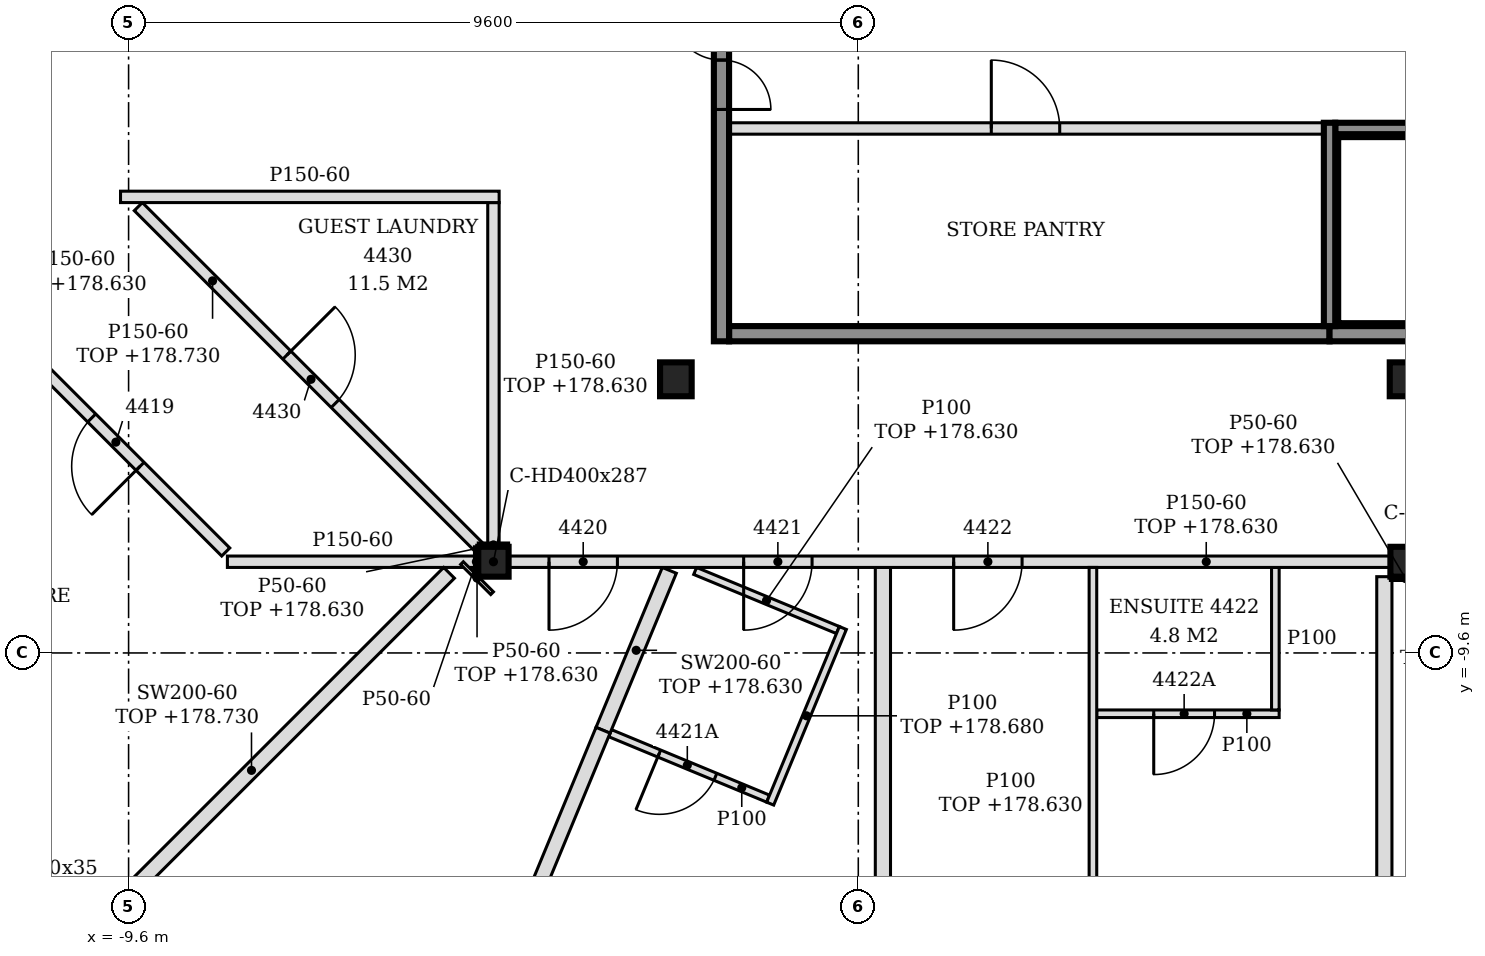
"""IFC4 building model, lengths in metres.
Left out: names, types, materials, properties, quantities, classifications, styles, units other than length and angle.
Written with IfcOpenShell. Run it as: python <this file> out.ifc"""

import sys

from ifc_helpers import new_model, si_unit, direction, frame, frame_2d, origin, origin_2d, place, context, subcontext, project, spatial, polyline, rectangle, i_section, outline, extrude, element, fill, save


model = new_model("IFC4")
c1 = context("Model", 3, precision=1e-05, world=origin(), true_north=direction((0.0, 1.0)))
c2 = subcontext(c1, "Body", "Model", "MODEL_VIEW")
j1 = project(units=[si_unit("LENGTHUNIT", "METRE"), si_unit("PLANEANGLEUNIT", "RADIAN")], contexts=[c1])
p1 = place(None, origin())
s1 = spatial("IfcSite", under=j1, at=p1, CompositionType="ELEMENT")
p2 = place(p1, origin())
s2 = spatial("IfcBuilding", under=s1, at=p2, CompositionType="ELEMENT")
p3 = place(p2, frame((0.0, 0.0, 175.8)))
s3 = spatial("IfcBuildingStorey", under=s2, at=p3, CompositionType="ELEMENT", Elevation=175.8)
for number, where, z_axis, x_axis in (
    (1, (-4.8, -8.4, -0.15), (0.0, 0.0, 1.0), (1.0, 0.0, 0.0)),
    (2, (7.2, -8.4, -0.15), (0.0, 0.0, 1.0), (1.0, 0.0, 0.0)),
):
    element("IfcColumn", number, at=place(p3, frame(where, z_axis=z_axis, x_axis=x_axis)), inside=s3, PredefinedType="COLUMN", context=c2, shape_type="SweptSolid", body=[
        extrude(i_section(OverallWidth=0.399, OverallDepth=0.393, WebThickness=0.023, FlangeThickness=0.037, FilletRadius=0.015, at=origin_2d()), origin(), (0.0, 0.0, 1.0), 3.6),
    ])
for number, where, z_axis, x_axis in (
    (3, (-2.4, -6.0, -0.15), (0.0, 0.0, 1.0), (1.0, 0.0, 0.0)),
    (4, (7.2, -6.0, -0.15), (0.0, 0.0, 1.0), (1.0, 0.0, 0.0)),
):
    element("IfcColumn", number, at=place(p3, frame(where, z_axis=z_axis, x_axis=x_axis)), inside=s3, PredefinedType="COLUMN", context=c2, shape_type="SweptSolid", body=[
        extrude(i_section(OverallWidth=0.416, OverallDepth=0.446, WebThickness=0.039, FlangeThickness=0.063, FilletRadius=0.015, at=origin_2d()), origin(), (0.0, 0.0, 1.0), 3.6),
    ])
p4 = place(p3, frame((-1.7, -5.4, 0.0), z_axis=(0.0, 0.0, 1.0), x_axis=(1.0, 0.0, 0.0)))
e5 = element("IfcWall", 5, at=p4, inside=s3, PredefinedType="SOLIDWALL", context=c2, shape_type="SweptSolid", body=[
    extrude(rectangle(XDim=7.9, YDim=0.2, at=frame_2d((3.95, 0.0))), origin(), (0.0, 0.0, 1.0), 3.45),
])
p5 = place(p3, frame((6.2, -5.4, 0.0), z_axis=(0.0, 0.0, 1.0), x_axis=(1.0, 0.0, 0.0)))
e6 = element("IfcWall", 6, at=p5, inside=s3, PredefinedType="SOLIDWALL", context=c2, shape_type="SweptSolid", body=[
    extrude(rectangle(XDim=6.5, YDim=0.2, at=frame_2d((3.25, 0.0))), origin(), (0.0, 0.0, 1.0), 3.45),
])
p6 = place(p3, frame((-1.7, -2.7, 0.0), z_axis=(0.0, 0.0, 1.0), x_axis=(1.0, 0.0, 0.0)))
e7 = element("IfcWall", 7, at=p6, inside=s3, PredefinedType="PARTITIONING", context=c2, shape_type="SweptSolid", body=[
    extrude(rectangle(XDim=7.825, YDim=0.15, at=frame_2d((3.913, 0.0))), origin(), (0.0, 0.0, 1.0), 3.45),
])
p7 = place(p6, frame((3.45, 0.0, 0.0)))
e8 = element("IfcOpeningElement", 8, at=p7, cuts=e7, PredefinedType="OPENING", context=c2, shape_type="SweptSolid", body=[
    extrude(rectangle(XDim=0.9, YDim=2.1, at=frame_2d((0.45, 1.05))), frame((0.0, 0.085, 0.0), z_axis=(0.0, -1.0, 0.0), x_axis=(1.0, 0.0, 0.0)), (0.0, 0.0, 1.0), 0.17),
])
p8 = place(p3, frame((6.275, -2.7, 0.0), z_axis=(0.0, 0.0, 1.0), x_axis=(1.0, 0.0, 0.0)))
e9 = element("IfcWall", 9, at=p8, inside=s3, PredefinedType="SOLIDWALL", context=c2, shape_type="SweptSolid", body=[
    extrude(rectangle(XDim=6.35, YDim=0.15, at=frame_2d((3.175, 0.0))), origin(), (0.0, 0.0, 1.0), 3.45),
])
p9 = place(p8, frame((5.225, 0.0, 0.0)))
e10 = element("IfcOpeningElement", 10, at=p9, cuts=e9, PredefinedType="OPENING", context=c2, shape_type="SweptSolid", body=[
    extrude(rectangle(XDim=1.0, YDim=2.1, at=frame_2d((0.5, 1.05))), frame((0.0, 0.085, 0.0), z_axis=(0.0, -1.0, 0.0), x_axis=(1.0, 0.0, 0.0)), (0.0, 0.0, 1.0), 0.17),
])
p10 = place(p3, frame((-1.8, -5.5, 0.0), z_axis=(0.0, 0.0, 1.0), x_axis=(0.0, 1.0, 0.0)))
e11 = element("IfcWall", 11, at=p10, inside=s3, PredefinedType="SOLIDWALL", context=c2, shape_type="SweptSolid", body=[
    extrude(rectangle(XDim=15.8, YDim=0.2, at=frame_2d((7.9, 0.0))), origin(), (0.0, 0.0, 1.0), 3.45),
])
p11 = place(p10, frame((3.05, 0.0, 0.0)))
e12 = element("IfcOpeningElement", 12, at=p11, cuts=e11, PredefinedType="OPENING", context=c2, shape_type="SweptSolid", body=[
    extrude(rectangle(XDim=1.3, YDim=2.1, at=frame_2d((0.65, 1.05))), frame((0.0, 0.11, 0.0), z_axis=(0.0, -1.0, 0.0), x_axis=(1.0, 0.0, 0.0)), (0.0, 0.0, 1.0), 0.22),
])
p12 = place(p10, frame((11.45, 0.0, 0.0)))
e13 = element("IfcOpeningElement", 13, at=p12, cuts=e11, PredefinedType="OPENING", context=c2, shape_type="SweptSolid", body=[
    extrude(rectangle(XDim=1.3, YDim=2.1, at=frame_2d((0.65, 1.05))), frame((0.0, 0.11, 0.0), z_axis=(0.0, -1.0, 0.0), x_axis=(1.0, 0.0, 0.0)), (0.0, 0.0, 1.0), 0.22),
])
p13 = place(p3, frame((6.2, -5.3, 0.0), z_axis=(0.0, 0.0, 1.0), x_axis=(0.0, 1.0, 0.0)))
e14 = element("IfcWall", 14, at=p13, inside=s3, PredefinedType="SOLIDWALL", context=c2, shape_type="SweptSolid", body=[
    extrude(rectangle(XDim=2.675, YDim=0.15, at=frame_2d((1.337, 0.0))), origin(), (0.0, 0.0, 1.0), 3.45),
])
p14 = place(p3, frame((0.324, -19.053, 0.0), z_axis=(0.0, 0.0, 1.0), x_axis=(0.0, 1.0, 0.0)))
e15 = element("IfcWall", 15, at=p14, inside=s3, PredefinedType="PARTITIONING", context=c2, shape_type="SweptSolid", body=[
    extrude(outline(polyline([(0.0, 0.0), (10.578, 0.0), (10.578, 2.83), (10.503, 2.83), (10.501, 3.45), (8.958, 3.45), (8.956, 2.88), (8.748, 2.88), (8.746, 3.45), (4.158, 3.45), (4.156, 2.88), (3.948, 2.88), (3.946, 3.45), (0.303, 3.45), (0.301, 2.93), (0.003, 2.93), (0.001, 3.45), (0.0, 3.45), (0.0, 0.0)])), frame((0.0, 0.1, 0.0), z_axis=(0.0, -1.0, 0.0), x_axis=(1.0, 0.0, 0.0)), (0.0, 0.0, 1.0), 0.2),
])
p15 = place(p3, frame((6.921, -19.053, 0.0), z_axis=(0.0, 0.0, 1.0), x_axis=(0.0, 1.0, 0.0)))
e16 = element("IfcWall", 16, at=p15, inside=s3, PredefinedType="PARTITIONING", context=c2, shape_type="SweptSolid", body=[
    extrude(outline(polyline([(0.0, 0.0), (10.457, 0.0), (10.457, 3.45), (8.958, 3.45), (8.956, 2.88), (8.748, 2.88), (8.746, 3.45), (4.158, 3.45), (4.156, 2.88), (3.948, 2.88), (3.946, 3.45), (0.303, 3.45), (0.301, 2.93), (0.003, 2.93), (0.001, 3.45), (0.0, 3.45), (0.0, 0.0)])), frame((0.0, 0.1, 0.0), z_axis=(0.0, -1.0, 0.0), x_axis=(1.0, 0.0, 0.0)), (0.0, 0.0, 1.0), 0.2),
])
p16 = place(p3, frame((3.087, -18.777, 0.0), z_axis=(0.0, 0.0, 1.0), x_axis=(0.0, 1.0, 0.0)))
e17 = element("IfcWall", 17, at=p16, inside=s3, PredefinedType="PARTITIONING", context=c2, shape_type="SweptSolid", body=[
    extrude(outline(polyline([(0.495, 0.0), (10.302, 0.0), (10.302, 0.863), (10.302, 1.725), (10.302, 2.587), (10.302, 2.83), (0.252, 2.83), (0.35, 2.587), (0.495, 1.725), (0.495, 0.863), (0.495, 0.0)])), frame((0.0, 0.05, 0.0), z_axis=(0.0, -1.0, 0.0), x_axis=(1.0, 0.0, 0.0)), (0.0, 0.0, 1.0), 0.1),
])
p17 = place(p16, frame((3.452, 0.0, 0.0)))
e18 = element("IfcOpeningElement", 18, at=p17, cuts=e17, PredefinedType="OPENING", context=c2, shape_type="SweptSolid", body=[
    extrude(rectangle(XDim=0.9, YDim=2.1, at=frame_2d((0.45, 1.05))), frame((0.0, 0.06, 0.0), z_axis=(0.0, -1.0, 0.0), x_axis=(1.0, 0.0, 0.0)), (0.0, 0.0, 1.0), 0.12),
])
p18 = place(p3, frame((-6.467, -18.123, 0.0), z_axis=(0.0, 0.0, 1.0), x_axis=(0.382668510089, 0.923885713379, 0.0)))
e19 = element("IfcWall", 19, at=p18, inside=s3, PredefinedType="PARTITIONING", context=c2, shape_type="SweptSolid", body=[
    extrude(rectangle(XDim=8.124, YDim=0.2, at=frame_2d((4.062, 0.0))), origin(), (0.0, 0.0, 1.0), 2.83),
])
p19 = place(p3, frame((-10.583, -13.743, 0.0), z_axis=(0.0, 0.0, 1.0), x_axis=(0.707173198016, 0.707040358118, 0.0)))
e20 = element("IfcWall", 20, at=p19, inside=s3, PredefinedType="PARTITIONING", context=c2, shape_type="SweptSolid", body=[
    extrude(rectangle(XDim=7.351, YDim=0.2, at=frame_2d((3.676, 0.0))), origin(), (0.0, 0.0, 1.0), 2.93),
])
p20 = place(p3, frame((-1.159, -11.582, 0.0), z_axis=(0.0, 0.0, 1.0), x_axis=(0.382423652519, 0.923987094062, 0.0)))
e21 = element("IfcWall", 21, at=p20, inside=s3, PredefinedType="PARTITIONING", context=c2, shape_type="SweptSolid", body=[
    extrude(rectangle(XDim=2.501, YDim=0.1, at=frame_2d((1.25, 0.0))), origin(), (0.0, 0.0, 1.0), 2.88),
])
p21 = place(p3, frame((-1.186, -11.517, 0.0), z_axis=(0.0, 0.0, 1.0), x_axis=(-0.923835689206, 0.382789262323, 0.0)))
e22 = element("IfcWall", 22, at=p21, inside=s3, PredefinedType="PARTITIONING", context=c2, shape_type="SweptSolid", body=[
    extrude(rectangle(XDim=2.251, YDim=0.1, at=frame_2d((1.125, 0.0))), origin(), (0.0, 0.0, 1.0), 3.45),
])
p22 = place(p21, frame((0.751, 0.0, 0.0)))
e23 = element("IfcOpeningElement", 23, at=p22, cuts=e22, PredefinedType="OPENING", context=c2, shape_type="SweptSolid", body=[
    extrude(rectangle(XDim=0.8, YDim=2.1, at=frame_2d((0.4, 1.05))), frame((0.0, 0.06, 0.0), z_axis=(0.0, -1.0, 0.0), x_axis=(1.0, 0.0, 0.0)), (0.0, 0.0, 1.0), 0.12),
])
p23 = place(p3, frame((-3.358, -10.617, 0.0), z_axis=(0.0, 0.0, 1.0), x_axis=(0.382840979218, 0.923814258729, 0.0)))
e24 = element("IfcWall", 24, at=p23, inside=s3, PredefinedType="PARTITIONING", context=c2, shape_type="SweptSolid", body=[
    extrude(rectangle(XDim=2.277, YDim=0.2, at=frame_2d((1.139, 0.0))), origin(), (0.0, 0.0, 1.0), 2.83),
])
p24 = place(p3, frame((3.137, -10.4, 0.0), z_axis=(0.0, 0.0, 1.0), x_axis=(1.0, 0.0, 0.0)))
e25 = element("IfcWall", 25, at=p24, inside=s3, PredefinedType="PARTITIONING", context=c2, shape_type="SweptSolid", body=[
    extrude(rectangle(XDim=2.4, YDim=0.1, at=frame_2d((1.2, 0.0))), origin(), (0.0, 0.0, 1.0), 3.45),
])
p25 = place(p24, frame((0.75, 0.0, 0.0)))
e26 = element("IfcOpeningElement", 26, at=p25, cuts=e25, PredefinedType="OPENING", context=c2, shape_type="SweptSolid", body=[
    extrude(rectangle(XDim=0.8, YDim=2.1, at=frame_2d((0.4, 1.05))), frame((0.0, 0.06, 0.0), z_axis=(0.0, -1.0, 0.0), x_axis=(1.0, 0.0, 0.0)), (0.0, 0.0, 1.0), 0.12),
])
p26 = place(p3, frame((5.487, -10.35, 0.0), z_axis=(0.0, 0.0, 1.0), x_axis=(0.0, 1.0, 0.0)))
e27 = element("IfcWall", 27, at=p26, inside=s3, PredefinedType="PARTITIONING", context=c2, shape_type="SweptSolid", body=[
    extrude(outline(polyline([(0.0, 0.0), (1.875, 0.0), (1.875, 2.83), (1.8, 2.83), (1.798, 3.45), (0.255, 3.45), (0.253, 2.88), (0.045, 2.88), (0.043, 3.45), (0.0, 3.45), (0.0, 0.0)])), frame((0.0, 0.05, 0.0), z_axis=(0.0, -1.0, 0.0), x_axis=(1.0, 0.0, 0.0)), (0.0, 0.0, 1.0), 0.1),
])
p27 = place(p3, frame((-0.268, -9.299, 0.0), z_axis=(0.0, 0.0, 1.0), x_axis=(-0.923927543828, 0.382567502222, 0.0)))
e28 = element("IfcWall", 28, at=p27, inside=s3, PredefinedType="PARTITIONING", context=c2, shape_type="SweptSolid", body=[
    extrude(rectangle(XDim=2.032, YDim=0.1, at=frame_2d((1.016, 0.0))), origin(), (0.0, 0.0, 1.0), 2.83),
])
p28 = place(p3, frame((-8.3, -8.4, 0.0), z_axis=(0.0, 0.0, 1.0), x_axis=(1.0, 0.0, 0.0)))
e29 = element("IfcWall", 29, at=p28, inside=s3, PredefinedType="PARTITIONING", context=c2, shape_type="SweptSolid", body=[
    extrude(rectangle(XDim=3.301, YDim=0.15, at=frame_2d((1.65, 0.0))), origin(), (0.0, 0.0, 1.0), 3.45),
])
p29 = place(p3, frame((-4.601, -8.4, 0.0), z_axis=(0.0, 0.0, 1.0), x_axis=(1.0, 0.0, 0.0)))
e30 = element("IfcWall", 30, at=p29, inside=s3, PredefinedType="PARTITIONING", context=c2, shape_type="SweptSolid", body=[
    extrude(rectangle(XDim=11.601, YDim=0.15, at=frame_2d((5.801, 0.0))), origin(), (0.0, 0.0, 1.0), 2.83),
])
p30 = place(p29, frame((0.531, 0.0, 0.0)))
e31 = element("IfcOpeningElement", 31, at=p30, cuts=e30, PredefinedType="OPENING", context=c2, shape_type="SweptSolid", body=[
    extrude(rectangle(XDim=0.9, YDim=2.1, at=frame_2d((0.45, 1.05))), frame((0.0, 0.085, 0.0), z_axis=(0.0, -1.0, 0.0), x_axis=(1.0, 0.0, 0.0)), (0.0, 0.0, 1.0), 0.17),
])
p31 = place(p29, frame((3.093, 0.0, 0.0)))
e32 = element("IfcOpeningElement", 32, at=p31, cuts=e30, PredefinedType="OPENING", context=c2, shape_type="SweptSolid", body=[
    extrude(rectangle(XDim=0.9, YDim=2.1, at=frame_2d((0.45, 1.05))), frame((0.0, 0.085, 0.0), z_axis=(0.0, -1.0, 0.0), x_axis=(1.0, 0.0, 0.0)), (0.0, 0.0, 1.0), 0.17),
])
p32 = place(p29, frame((5.855, 0.0, 0.0)))
e33 = element("IfcOpeningElement", 33, at=p32, cuts=e30, PredefinedType="OPENING", context=c2, shape_type="SweptSolid", body=[
    extrude(rectangle(XDim=0.9, YDim=2.1, at=frame_2d((0.45, 1.05))), frame((0.0, 0.085, 0.0), z_axis=(0.0, -1.0, 0.0), x_axis=(1.0, 0.0, 0.0)), (0.0, 0.0, 1.0), 0.17),
])
p33 = place(p3, frame((-8.322, -8.272, 0.0), z_axis=(0.0, 0.0, 1.0), x_axis=(-0.707106781187, 0.707106781187, 0.0)))
e34 = element("IfcWall", 34, at=p33, inside=s3, PredefinedType="PARTITIONING", context=c2, shape_type="SweptSolid", body=[
    extrude(rectangle(XDim=8.415, YDim=0.15, at=frame_2d((4.207, 0.0))), origin(), (0.0, 0.0, 1.0), 2.83),
])
p34 = place(p33, frame((5.515, 0.0, 0.0)))
e35 = element("IfcOpeningElement", 35, at=p34, cuts=e34, PredefinedType="OPENING", context=c2, shape_type="SweptSolid", body=[
    extrude(rectangle(XDim=0.9, YDim=2.1, at=frame_2d((0.45, 1.05))), frame((0.0, 0.085, 0.0), z_axis=(0.0, -1.0, 0.0), x_axis=(1.0, 0.0, 0.0)), (0.0, 0.0, 1.0), 0.17),
])
p35 = place(p33, frame((1.594, 0.0, 0.0)))
e36 = element("IfcOpeningElement", 36, at=p35, cuts=e34, PredefinedType="OPENING", context=c2, shape_type="SweptSolid", body=[
    extrude(rectangle(XDim=0.9, YDim=2.1, at=frame_2d((0.45, 1.05))), frame((0.0, 0.085, 0.0), z_axis=(0.0, -1.0, 0.0), x_axis=(1.0, 0.0, 0.0)), (0.0, 0.0, 1.0), 0.17),
])
p36 = place(p3, frame((-4.998, -8.202, 0.0), z_axis=(0.0, 0.0, 1.0), x_axis=(-0.707106781187, 0.707106781187, 0.0)))
e37 = element("IfcWall", 37, at=p36, inside=s3, PredefinedType="PARTITIONING", context=c2, shape_type="SweptSolid", body=[
    extrude(rectangle(XDim=6.327, YDim=0.15, at=frame_2d((3.164, 0.0))), origin(), (0.0, 0.0, 1.0), 2.93),
])
p37 = place(p36, frame((2.664, 0.0, 0.0)))
e38 = element("IfcOpeningElement", 38, at=p37, cuts=e37, PredefinedType="OPENING", context=c2, shape_type="SweptSolid", body=[
    extrude(rectangle(XDim=0.9, YDim=2.1, at=frame_2d((0.45, 1.05))), frame((0.0, 0.085, 0.0), z_axis=(0.0, -1.0, 0.0), x_axis=(1.0, 0.0, 0.0)), (0.0, 0.0, 1.0), 0.17),
])
p38 = place(p3, frame((-4.8, -8.204, 0.0), z_axis=(0.0, 0.0, 1.0), x_axis=(0.0, 1.0, 0.0)))
e39 = element("IfcWall", 39, at=p38, inside=s3, PredefinedType="PARTITIONING", context=c2, shape_type="SweptSolid", body=[
    extrude(rectangle(XDim=4.529, YDim=0.15, at=frame_2d((2.264, 0.0))), origin(), (0.0, 0.0, 1.0), 2.83),
])
p39 = place(p3, frame((-9.706, -3.6, 0.0), z_axis=(0.0, 0.0, 1.0), x_axis=(1.0, 0.0, 0.0)))
e40 = element("IfcWall", 40, at=p39, inside=s3, PredefinedType="PARTITIONING", context=c2, shape_type="SweptSolid", body=[
    extrude(outline(polyline([(0.0, 0.0), (4.981, 0.0), (4.981, 2.83), (4.756, 2.83), (4.754, 3.45), (0.0, 3.45), (0.0, 0.0)])), frame((0.0, 0.075, 0.0), z_axis=(0.0, -1.0, 0.0), x_axis=(1.0, 0.0, 0.0)), (0.0, 0.0, 1.0), 0.15),
])
for number, where, z_axis, x_axis in (
    (41, (-5.0, -8.178, 0.0), (0.0, 0.0, 1.0), (1.0, 0.0, 0.0)),
    (42, (7.0, -8.622, 0.0), (0.0, 0.0, 1.0), (1.0, 0.0, 0.0)),
):
    element("IfcWall", number, at=place(p3, frame(where, z_axis=z_axis, x_axis=x_axis)), inside=s3, PredefinedType="PARTITIONING", context=c2, shape_type="SweptSolid", body=[
        extrude(rectangle(XDim=0.399, YDim=0.05, at=frame_2d((0.199, 0.0))), origin(), (0.0, 0.0, 1.0), 2.83),
    ])
p40 = place(p3, frame((-4.818, -8.814, 0.0), z_axis=(0.0, 0.0, 1.0), x_axis=(-0.707106781187, 0.707106781187, 0.0)))
e43 = element("IfcWall", 43, at=p40, inside=s3, PredefinedType="PARTITIONING", context=c2, shape_type="SweptSolid", body=[
    extrude(rectangle(XDim=0.56, YDim=0.05, at=frame_2d((0.28, 0.0))), origin(), (0.0, 0.0, 1.0), 2.83),
])
p41 = place(p3, frame((-5.024, -8.596, 0.0), z_axis=(0.0, 0.0, 1.0), x_axis=(0.0, 1.0, 0.0)))
e44 = element("IfcWall", 44, at=p41, inside=s3, PredefinedType="PARTITIONING", context=c2, shape_type="SweptSolid", body=[
    extrude(rectangle(XDim=0.393, YDim=0.05, at=frame_2d((0.196, 0.0))), origin(), (0.0, 0.0, 1.0), 3.45),
])
p42 = place(p11, origin())
e45 = element("IfcDoor", 45, at=p42, inside=s3, OperationType="DOUBLE_DOOR_SINGLE_SWING", PredefinedType="DOOR", context=c2, shape_type="SweptSolid", body=[
    extrude(rectangle(XDim=1.3, YDim=2.1, at=frame_2d((0.65, 1.05))), frame((0.0, 0.025, 0.0), z_axis=(0.0, -1.0, 0.0), x_axis=(1.0, 0.0, 0.0)), (0.0, 0.0, 1.0), 0.05),
])
fill(e12, e45)
p43 = place(p7, origin())
e46 = element("IfcDoor", 46, at=p43, inside=s3, OperationType="SINGLE_SWING_LEFT", PredefinedType="DOOR", context=c2, shape_type="SweptSolid", body=[
    extrude(rectangle(XDim=0.9, YDim=2.1, at=frame_2d((0.45, 1.05))), frame((0.0, 0.025, 0.0), z_axis=(0.0, -1.0, 0.0), x_axis=(1.0, 0.0, 0.0)), (0.0, 0.0, 1.0), 0.05),
])
fill(e8, e46)
p44 = place(p35, origin())
e47 = element("IfcDoor", 47, at=p44, inside=s3, OperationType="SINGLE_SWING_LEFT", PredefinedType="DOOR", context=c2, shape_type="SweptSolid", body=[
    extrude(rectangle(XDim=0.9, YDim=2.1, at=frame_2d((0.45, 1.05))), frame((0.0, 0.025, 0.0), z_axis=(0.0, -1.0, 0.0), x_axis=(1.0, 0.0, 0.0)), (0.0, 0.0, 1.0), 0.05),
])
fill(e36, e47)
p45 = place(p30, frame((0.9, 0.0, 0.0), z_axis=(0.0, 0.0, 1.0), x_axis=(-1.0, 0.0, 0.0)))
e48 = element("IfcDoor", 48, at=p45, inside=s3, OperationType="SINGLE_SWING_RIGHT", PredefinedType="DOOR", context=c2, shape_type="SweptSolid", body=[
    extrude(rectangle(XDim=0.9, YDim=2.1, at=frame_2d((0.45, 1.05))), frame((0.0, 0.025, 0.0), z_axis=(0.0, -1.0, 0.0), x_axis=(1.0, 0.0, 0.0)), (0.0, 0.0, 1.0), 0.05),
])
fill(e31, e48)
p46 = place(p31, frame((0.9, 0.0, 0.0), z_axis=(0.0, 0.0, 1.0), x_axis=(-1.0, 0.0, 0.0)))
e49 = element("IfcDoor", 49, at=p46, inside=s3, OperationType="SINGLE_SWING_RIGHT", PredefinedType="DOOR", context=c2, shape_type="SweptSolid", body=[
    extrude(rectangle(XDim=0.9, YDim=2.1, at=frame_2d((0.45, 1.05))), frame((0.0, 0.025, 0.0), z_axis=(0.0, -1.0, 0.0), x_axis=(1.0, 0.0, 0.0)), (0.0, 0.0, 1.0), 0.05),
])
fill(e32, e49)
p47 = place(p22, origin())
e50 = element("IfcDoor", 50, at=p47, inside=s3, OperationType="SINGLE_SWING_RIGHT", PredefinedType="DOOR", context=c2, shape_type="SweptSolid", body=[
    extrude(rectangle(XDim=0.8, YDim=2.1, at=frame_2d((0.4, 1.05))), frame((0.0, 0.025, 0.0), z_axis=(0.0, -1.0, 0.0), x_axis=(1.0, 0.0, 0.0)), (0.0, 0.0, 1.0), 0.05),
])
fill(e23, e50)
p48 = place(p32, frame((0.9, 0.0, 0.0), z_axis=(0.0, 0.0, 1.0), x_axis=(-1.0, 0.0, 0.0)))
e51 = element("IfcDoor", 51, at=p48, inside=s3, OperationType="SINGLE_SWING_RIGHT", PredefinedType="DOOR", context=c2, shape_type="SweptSolid", body=[
    extrude(rectangle(XDim=0.9, YDim=2.1, at=frame_2d((0.45, 1.05))), frame((0.0, 0.025, 0.0), z_axis=(0.0, -1.0, 0.0), x_axis=(1.0, 0.0, 0.0)), (0.0, 0.0, 1.0), 0.05),
])
fill(e33, e51)
p49 = place(p25, frame((0.8, 0.0, 0.0), z_axis=(0.0, 0.0, 1.0), x_axis=(-1.0, 0.0, 0.0)))
e52 = element("IfcDoor", 52, at=p49, inside=s3, OperationType="SINGLE_SWING_RIGHT", PredefinedType="DOOR", context=c2, shape_type="SweptSolid", body=[
    extrude(rectangle(XDim=0.8, YDim=2.1, at=frame_2d((0.4, 1.05))), frame((0.0, 0.025, 0.0), z_axis=(0.0, -1.0, 0.0), x_axis=(1.0, 0.0, 0.0)), (0.0, 0.0, 1.0), 0.05),
])
fill(e26, e52)
p50 = place(p37, frame((0.9, 0.0, 0.0), z_axis=(0.0, 0.0, 1.0), x_axis=(-1.0, 0.0, 0.0)))
e53 = element("IfcDoor", 53, at=p50, inside=s3, OperationType="SINGLE_SWING_LEFT", PredefinedType="DOOR", context=c2, shape_type="SweptSolid", body=[
    extrude(rectangle(XDim=0.9, YDim=2.1, at=frame_2d((0.45, 1.05))), frame((0.0, 0.025, 0.0), z_axis=(0.0, -1.0, 0.0), x_axis=(1.0, 0.0, 0.0)), (0.0, 0.0, 1.0), 0.05),
])
fill(e38, e53)
save(model, sys.argv[1])
